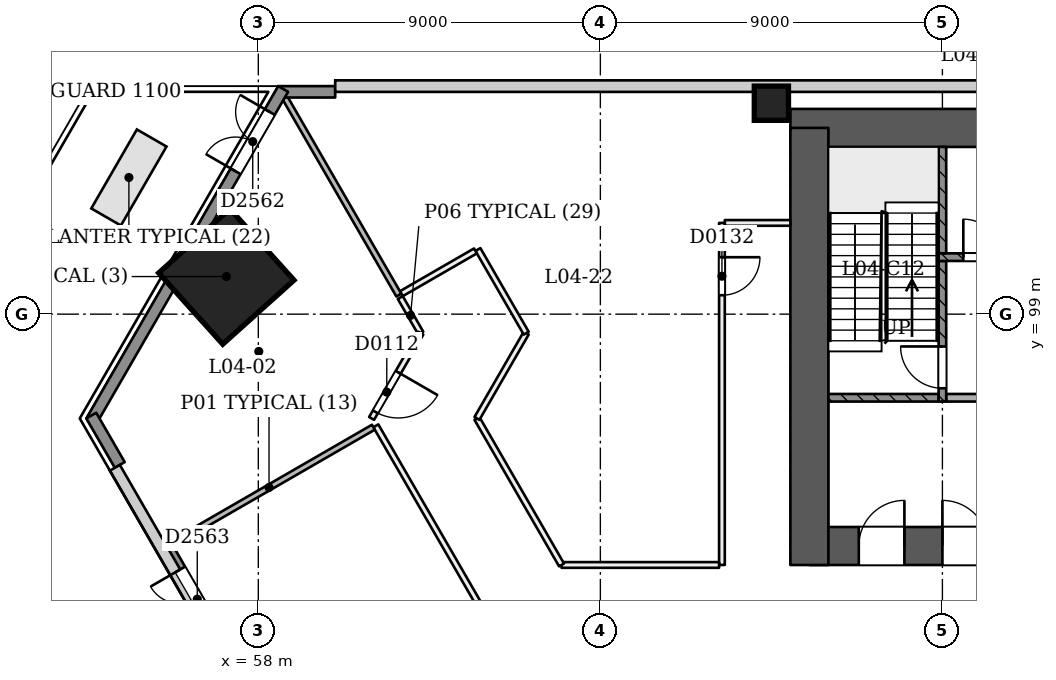
"""IFC4 building model, lengths in metres.
Left out: names, types, materials, properties, quantities, classifications, styles, units other than length and angle.
Written with IfcOpenShell. Run it as: python <this file> out.ifc"""

import sys

from ifc_helpers import new_model, si_unit, direction, frame, frame_2d, origin, origin_2d, place, context, subcontext, project, spatial, rectangle, extrude, element, fill, save


model = new_model("IFC4")
c1 = context("Model", 3, precision=1e-05, world=origin(), true_north=direction((0.0, 1.0)))
c2 = subcontext(c1, "Body", "Model", "MODEL_VIEW")
j1 = project(units=[si_unit("LENGTHUNIT", "METRE"), si_unit("PLANEANGLEUNIT", "RADIAN")], contexts=[c1])
p1 = place(None, origin())
s1 = spatial("IfcSite", under=j1, at=p1, CompositionType="ELEMENT")
p2 = place(p1, origin())
s2 = spatial("IfcBuilding", under=s1, at=p2, CompositionType="ELEMENT")
p3 = place(p2, frame((0.0, 0.0, 22.5)))
s3 = spatial("IfcBuildingStorey", under=s2, at=p3, CompositionType="ELEMENT", Elevation=22.5)
p4 = place(p3, frame((72.5, 92.9, 0.0), z_axis=(0.0, 0.0, 1.0), x_axis=(1.0, 0.0, 0.0)))
e1 = element("IfcWall", 1, at=p4, inside=s3, PredefinedType="SHEAR", context=c2, shape_type="SweptSolid", body=[
    extrude(rectangle(XDim=25.5, YDim=1.0, at=frame_2d((12.75, 0.0))), origin(), (0.0, 0.0, 1.0), 4.5),
])
p5 = place(p4, frame((1.3, 0.0, 0.0)))
e2 = element("IfcOpeningElement", 2, at=p5, cuts=e1, PredefinedType="OPENING", context=c2, shape_type="SweptSolid", body=[
    extrude(rectangle(XDim=1.2, YDim=2.1, at=frame_2d((0.6, 1.05))), frame((0.0, 0.51, 0.0), z_axis=(0.0, -1.0, 0.0), x_axis=(1.0, 0.0, 0.0)), (0.0, 0.0, 1.0), 1.021),
])
p6 = place(p4, frame((3.5, 0.0, 0.0)))
e3 = element("IfcOpeningElement", 3, at=p6, cuts=e1, PredefinedType="OPENING", context=c2, shape_type="SweptSolid", body=[
    extrude(rectangle(XDim=1.2, YDim=2.1, at=frame_2d((0.6, 1.05))), frame((0.0, 0.51, 0.0), z_axis=(0.0, -1.0, 0.0), x_axis=(1.0, 0.0, 0.0)), (0.0, 0.0, 1.0), 1.021),
])
p7 = place(p4, frame((13.5, 0.0, 0.0)))
e4 = element("IfcOpeningElement", 4, at=p7, cuts=e1, PredefinedType="OPENING", context=c2, shape_type="SweptSolid", body=[
    extrude(rectangle(XDim=1.2, YDim=2.1, at=frame_2d((0.6, 1.05))), frame((0.0, 0.51, 0.0), z_axis=(0.0, -1.0, 0.0), x_axis=(1.0, 0.0, 0.0)), (0.0, 0.0, 1.0), 1.021),
])
p8 = place(p4, frame((15.562, 0.0, 0.0)))
e5 = element("IfcOpeningElement", 5, at=p8, cuts=e1, PredefinedType="OPENING", context=c2, shape_type="SweptSolid", body=[
    extrude(rectangle(XDim=1.0, YDim=2.1, at=frame_2d((0.5, 1.05))), frame((0.0, 0.51, 0.0), z_axis=(0.0, -1.0, 0.0), x_axis=(1.0, 0.0, 0.0)), (0.0, 0.0, 1.0), 1.021),
])
p9 = place(p4, frame((17.8, 0.0, 0.0)))
e6 = element("IfcOpeningElement", 6, at=p9, cuts=e1, PredefinedType="OPENING", context=c2, shape_type="SweptSolid", body=[
    extrude(rectangle(XDim=1.0, YDim=2.1, at=frame_2d((0.5, 1.05))), frame((0.0, 0.51, 0.0), z_axis=(0.0, -1.0, 0.0), x_axis=(1.0, 0.0, 0.0)), (0.0, 0.0, 1.0), 1.021),
])
p10 = place(p4, frame((20.35, 0.0, 0.0)))
e7 = element("IfcOpeningElement", 7, at=p10, cuts=e1, PredefinedType="OPENING", context=c2, shape_type="SweptSolid", body=[
    extrude(rectangle(XDim=1.0, YDim=2.1, at=frame_2d((0.5, 1.05))), frame((0.0, 0.51, 0.0), z_axis=(0.0, -1.0, 0.0), x_axis=(1.0, 0.0, 0.0)), (0.0, 0.0, 1.0), 1.021),
])
p11 = place(p4, frame((22.837, 0.0, 0.0)))
e8 = element("IfcOpeningElement", 8, at=p11, cuts=e1, PredefinedType="OPENING", context=c2, shape_type="SweptSolid", body=[
    extrude(rectangle(XDim=1.0, YDim=2.1, at=frame_2d((0.5, 1.05))), frame((0.0, 0.51, 0.0), z_axis=(0.0, -1.0, 0.0), x_axis=(1.0, 0.0, 0.0)), (0.0, 0.0, 1.0), 1.021),
])
p12 = place(p3, frame((97.5, 103.9, 0.0), z_axis=(0.0, 0.0, 1.0), x_axis=(-1.0, 0.0, 0.0)))
e9 = element("IfcWall", 9, at=p12, inside=s3, PredefinedType="SHEAR", context=c2, shape_type="SweptSolid", body=[
    extrude(rectangle(XDim=25.5, YDim=1.0, at=frame_2d((12.75, 0.0))), origin(), (0.0, 0.0, 1.0), 4.5),
])
p13 = place(p3, frame((72.5, 103.9, 0.0), z_axis=(0.0, 0.0, 1.0), x_axis=(0.0, -1.0, 0.0)))
e10 = element("IfcWall", 10, at=p13, inside=s3, PredefinedType="SHEAR", context=c2, shape_type="SweptSolid", body=[
    extrude(rectangle(XDim=11.5, YDim=1.0, at=frame_2d((5.75, 0.0))), origin(), (0.0, 0.0, 1.0), 4.5),
])
p14 = place(p3, frame((57.125, 99.978, 0.0), z_axis=(0.028361945142, 0.009218987905, 0.999555206244), x_axis=(-0.865334335433, 0.500798463027, 0.019934576753)))
e11 = element("IfcColumn", 11, at=p14, inside=s3, PredefinedType="COLUMN", context=c2, shape_type="SweptSolid", body=[
    extrude(rectangle(XDim=2.52, YDim=2.52, at=origin_2d()), origin(), (0.0, 0.0, 1.0), 4.502),
])
p15 = place(p3, frame((71.5, 104.55, 0.0), z_axis=(0.0, 0.0, 1.0), x_axis=(1.0, 0.0, 0.0)))
e12 = element("IfcColumn", 12, at=p15, inside=s3, PredefinedType="COLUMN", context=c2, shape_type="SweptSolid", body=[
    extrude(rectangle(XDim=0.9, YDim=0.9, at=origin_2d()), origin(), (0.0, 0.0, 1.0), 4.5),
])
p16 = place(p3, frame((61.736, 99.436, 0.0), z_axis=(0.0, 0.0, 1.0), x_axis=(0.500002782129, -0.866023797515, 0.0)))
e13 = element("IfcWall", 13, at=p16, inside=s3, PredefinedType="PARTITIONING", context=c2, shape_type="SweptSolid", body=[
    extrude(rectangle(XDim=1.081, YDim=0.15, at=frame_2d((0.54, 0.0))), origin(), (0.0, 0.0, 1.0), 4.0),
])
p17 = place(p3, frame((62.276, 98.5, 0.0), z_axis=(0.0, 0.0, 1.0), x_axis=(-0.499939993713, -0.866060045659, 0.0)))
e14 = element("IfcWall", 14, at=p17, inside=s3, PredefinedType="PARTITIONING", context=c2, shape_type="SweptSolid", body=[
    extrude(rectangle(XDim=2.591, YDim=0.15, at=frame_2d((1.295, 0.0))), origin(), (0.0, 0.0, 1.0), 4.0),
])
p18 = place(p17, frame((1.191, 0.0, 0.0)))
e15 = element("IfcOpeningElement", 15, at=p18, cuts=e14, PredefinedType="OPENING", context=c2, shape_type="SweptSolid", body=[
    extrude(rectangle(XDim=1.2, YDim=2.1, at=frame_2d((0.6, 1.05))), frame((0.0, 0.085, 0.0), z_axis=(0.0, -1.0, 0.0), x_axis=(1.0, 0.0, 0.0)), (0.0, 0.0, 1.0), 0.171),
])
p19 = place(p3, frame((61.093, 96.062, 0.0), z_axis=(0.0, 0.0, 1.0), x_axis=(0.5000018851, -0.866024315419, 0.0)))
e16 = element("IfcWall", 16, at=p19, inside=s3, PredefinedType="PARTITIONING", context=c2, shape_type="SweptSolid", body=[
    extrude(rectangle(XDim=45.0, YDim=0.15, at=frame_2d((22.5, 0.0))), origin(), (0.0, 0.0, 1.0), 3.6),
])
p20 = place(p19, frame((6.15, 0.0, 0.0)))
e17 = element("IfcOpeningElement", 17, at=p20, cuts=e16, PredefinedType="OPENING", context=c2, shape_type="SweptSolid", body=[
    extrude(rectangle(XDim=1.2, YDim=2.1, at=frame_2d((0.6, 1.05))), frame((0.0, 0.085, 0.0), z_axis=(0.0, -1.0, 0.0), x_axis=(1.0, 0.0, 0.0)), (0.0, 0.0, 1.0), 0.171),
])
p21 = place(p19, frame((16.3, 0.0, 0.0)))
e18 = element("IfcOpeningElement", 18, at=p21, cuts=e16, PredefinedType="OPENING", context=c2, shape_type="SweptSolid", body=[
    extrude(rectangle(XDim=1.2, YDim=2.1, at=frame_2d((0.6, 1.05))), frame((0.0, 0.085, 0.0), z_axis=(0.0, -1.0, 0.0), x_axis=(1.0, 0.0, 0.0)), (0.0, 0.0, 1.0), 0.171),
])
p22 = place(p19, frame((24.25, 0.0, 0.0)))
e19 = element("IfcOpeningElement", 19, at=p22, cuts=e16, PredefinedType="OPENING", context=c2, shape_type="SweptSolid", body=[
    extrude(rectangle(XDim=1.0, YDim=2.1, at=frame_2d((0.5, 1.05))), frame((0.0, 0.085, 0.0), z_axis=(0.0, -1.0, 0.0), x_axis=(1.0, 0.0, 0.0)), (0.0, 0.0, 1.0), 0.171),
])
p23 = place(p19, frame((27.721, 0.0, 0.0)))
e20 = element("IfcOpeningElement", 20, at=p23, cuts=e16, PredefinedType="OPENING", context=c2, shape_type="SweptSolid", body=[
    extrude(rectangle(XDim=0.9, YDim=2.1, at=frame_2d((0.45, 1.05))), frame((0.0, 0.085, 0.0), z_axis=(0.0, -1.0, 0.0), x_axis=(1.0, 0.0, 0.0)), (0.0, 0.0, 1.0), 0.171),
])
p24 = place(p19, frame((29.971, 0.0, 0.0)))
e21 = element("IfcOpeningElement", 21, at=p24, cuts=e16, PredefinedType="OPENING", context=c2, shape_type="SweptSolid", body=[
    extrude(rectangle(XDim=0.9, YDim=2.1, at=frame_2d((0.45, 1.05))), frame((0.0, 0.085, 0.0), z_axis=(0.0, -1.0, 0.0), x_axis=(1.0, 0.0, 0.0)), (0.0, 0.0, 1.0), 0.171),
])
p25 = place(p19, frame((37.65, 0.0, 0.0)))
e22 = element("IfcOpeningElement", 22, at=p25, cuts=e16, PredefinedType="OPENING", context=c2, shape_type="SweptSolid", body=[
    extrude(rectangle(XDim=1.2, YDim=2.1, at=frame_2d((0.6, 1.05))), frame((0.0, 0.085, 0.0), z_axis=(0.0, -1.0, 0.0), x_axis=(1.0, 0.0, 0.0)), (0.0, 0.0, 1.0), 0.171),
])
p26 = place(p3, frame((72.0, 101.401, 0.0), z_axis=(0.0, 0.0, 1.0), x_axis=(-0.999999909973, -0.000424328109, 0.0)))
e23 = element("IfcWall", 23, at=p26, inside=s3, PredefinedType="PARTITIONING", context=c2, shape_type="SweptSolid", body=[
    extrude(rectangle(XDim=1.726, YDim=0.15, at=frame_2d((0.863, 0.0))), origin(), (0.0, 0.0, 1.0), 4.0),
])
p27 = place(p3, frame((70.199, 101.4, 0.0), z_axis=(0.0, 0.0, 1.0), x_axis=(0.0, -1.0, 0.0)))
e24 = element("IfcWall", 24, at=p27, inside=s3, PredefinedType="PARTITIONING", context=c2, shape_type="SweptSolid", body=[
    extrude(rectangle(XDim=8.999, YDim=0.15, at=frame_2d((4.5, 0.0))), origin(), (0.0, 0.0, 1.0), 4.0),
])
p28 = place(p27, frame((0.902, 0.0, 0.0)))
e25 = element("IfcOpeningElement", 25, at=p28, cuts=e24, PredefinedType="OPENING", context=c2, shape_type="SweptSolid", body=[
    extrude(rectangle(XDim=1.0, YDim=2.1, at=frame_2d((0.5, 1.05))), frame((0.0, 0.085, 0.0), z_axis=(0.0, -1.0, 0.0), x_axis=(1.0, 0.0, 0.0)), (0.0, 0.0, 1.0), 0.171),
])
p29 = place(p3, frame((70.124, 92.401, 0.0), z_axis=(0.0, 0.0, 1.0), x_axis=(-1.0, 0.0, 0.0)))
e26 = element("IfcWall", 26, at=p29, inside=s3, PredefinedType="PARTITIONING", context=c2, shape_type="SweptSolid", body=[
    extrude(rectangle(XDim=4.145, YDim=0.15, at=frame_2d((2.073, 0.0))), origin(), (0.0, 0.0, 1.0), 4.0),
])
p30 = place(p3, frame((65.979, 92.401, 0.0), z_axis=(0.0, 0.0, 1.0), x_axis=(-0.499978799242, 0.866037643702, 0.0)))
e27 = element("IfcWall", 27, at=p30, inside=s3, PredefinedType="PARTITIONING", context=c2, shape_type="SweptSolid", body=[
    extrude(rectangle(XDim=4.452, YDim=0.15, at=frame_2d((2.226, 0.0))), origin(), (0.0, 0.0, 1.0), 4.0),
])
p31 = place(p3, frame((63.753, 96.256, 0.0), z_axis=(0.0, 0.0, 1.0), x_axis=(0.499939993713, 0.866060045659, 0.0)))
e28 = element("IfcWall", 28, at=p31, inside=s3, PredefinedType="PARTITIONING", context=c2, shape_type="SweptSolid", body=[
    extrude(rectangle(XDim=2.591, YDim=0.15, at=frame_2d((1.295, 0.0))), origin(), (0.0, 0.0, 1.0), 4.0),
])
p32 = place(p3, frame((65.048, 98.5, 0.0), z_axis=(0.0, 0.0, 1.0), x_axis=(-0.500024647231, 0.866011173231, 0.0)))
e29 = element("IfcWall", 29, at=p32, inside=s3, PredefinedType="PARTITIONING", context=c2, shape_type="SweptSolid", body=[
    extrude(rectangle(XDim=2.541, YDim=0.15, at=frame_2d((1.271, 0.0))), origin(), (0.0, 0.0, 1.0), 4.0),
])
p33 = place(p3, frame((63.713, 100.663, 0.0), z_axis=(0.0, 0.0, 1.0), x_axis=(-0.866200031611, -0.499697413678, 0.0)))
e30 = element("IfcWall", 30, at=p33, inside=s3, PredefinedType="PARTITIONING", context=c2, shape_type="SweptSolid", body=[
    extrude(rectangle(XDim=2.251, YDim=0.15, at=frame_2d((1.125, 0.0))), origin(), (0.0, 0.0, 1.0), 4.0),
])
p34 = place(p3, frame((55.536, 92.854, 0.0), z_axis=(0.0, 0.0, 1.0), x_axis=(0.866031065609, 0.499990193304, 0.0)))
e31 = element("IfcWall", 31, at=p34, inside=s3, PredefinedType="PARTITIONING", context=c2, shape_type="SweptSolid", body=[
    extrude(rectangle(XDim=6.341, YDim=0.15, at=frame_2d((3.17, 0.0))), origin(), (0.0, 0.0, 1.0), 3.5),
])
p35 = place(p3, frame((61.698, 99.501, 0.0), z_axis=(0.0, 0.0, 1.0), x_axis=(-0.500013984911, 0.866017329442, 0.0)))
e32 = element("IfcWall", 32, at=p35, inside=s3, PredefinedType="PARTITIONING", context=c2, shape_type="SweptSolid", body=[
    extrude(rectangle(XDim=6.234, YDim=0.15, at=frame_2d((3.117, 0.0))), origin(), (0.0, 0.0, 1.0), 3.5),
])
p36 = place(p3, frame((58.523, 104.85, 0.0), z_axis=(0.0, 0.0, 1.0), x_axis=(1.0, 0.0, 0.0)))
e33 = element("IfcWall", 33, at=p36, inside=s3, PredefinedType="SOLIDWALL", context=c2, shape_type="SweptSolid", body=[
    extrude(rectangle(XDim=1.5, YDim=0.3, at=frame_2d((0.75, 0.0))), origin(), (0.0, 0.0, 1.0), 3.5),
])
p37 = place(p3, frame((53.605, 96.181, 0.0), z_axis=(0.0, 0.0, 1.0), x_axis=(0.499995964007, 0.866027733953, 0.0)))
e34 = element("IfcWall", 34, at=p37, inside=s3, PredefinedType="SOLIDWALL", context=c2, shape_type="SweptSolid", body=[
    extrude(rectangle(XDim=10.096, YDim=0.3, at=frame_2d((5.048, 0.0))), origin(), (0.0, 0.0, 1.0), 3.5),
])
p38 = place(p37, frame((7.596, 0.0, 0.0)))
e35 = element("IfcOpeningElement", 35, at=p38, cuts=e34, PredefinedType="OPENING", context=c2, shape_type="SweptSolid", body=[
    extrude(rectangle(XDim=1.8, YDim=2.4, at=frame_2d((0.9, 1.2))), frame((0.0, 0.161, 0.0), z_axis=(0.0, -1.0, 0.0), x_axis=(1.0, 0.0, 0.0)), (0.0, 0.0, 1.0), 0.321),
])
p39 = place(p3, frame((54.355, 95.032, 0.0), z_axis=(0.0, 0.0, 1.0), x_axis=(-0.499990139034, 0.866031096941, 0.0)))
e36 = element("IfcWall", 36, at=p39, inside=s3, PredefinedType="SOLIDWALL", context=c2, shape_type="SweptSolid", body=[
    extrude(rectangle(XDim=1.5, YDim=0.3, at=frame_2d((0.75, 0.0))), origin(), (0.0, 0.0, 1.0), 3.5),
])
p40 = place(p3, frame((57.144, 90.203, 0.0), z_axis=(0.0, 0.0, 1.0), x_axis=(-0.50002537861, 0.866010750942, 0.0)))
e37 = element("IfcWall", 37, at=p40, inside=s3, PredefinedType="SOLIDWALL", context=c2, shape_type="SweptSolid", body=[
    extrude(rectangle(XDim=3.0, YDim=0.3, at=frame_2d((1.5, 0.0))), origin(), (0.0, 0.0, 1.0), 3.5),
])
p41 = place(p40, frame((0.6, 0.0, 0.0)))
e38 = element("IfcOpeningElement", 38, at=p41, cuts=e37, PredefinedType="OPENING", context=c2, shape_type="SweptSolid", body=[
    extrude(rectangle(XDim=1.8, YDim=2.4, at=frame_2d((0.9, 1.2))), frame((0.0, 0.161, 0.0), z_axis=(0.0, -1.0, 0.0), x_axis=(1.0, 0.0, 0.0)), (0.0, 0.0, 1.0), 0.321),
])
p42 = place(p3, frame((73.0, 96.8, 0.0), z_axis=(0.0, 0.0, 1.0), x_axis=(1.0, 0.0, 0.0)))
e39 = element("IfcWall", 39, at=p42, inside=s3, PredefinedType="SOLIDWALL", context=c2, shape_type="SweptSolid", body=[
    extrude(rectangle(XDim=2.9, YDim=0.2, at=frame_2d((1.45, 0.0))), origin(), (0.0, 0.0, 1.0), 4.0),
])
p43 = place(p3, frame((76.0, 96.7, 0.0), z_axis=(0.0, 0.0, 1.0), x_axis=(0.0, 1.0, 0.0)))
e40 = element("IfcWall", 40, at=p43, inside=s3, PredefinedType="SOLIDWALL", context=c2, shape_type="SweptSolid", body=[
    extrude(rectangle(XDim=3.7, YDim=0.2, at=frame_2d((1.85, 0.0))), origin(), (0.0, 0.0, 1.0), 4.0),
])
p44 = place(p43, frame((0.35, 0.0, 0.0)))
e41 = element("IfcOpeningElement", 41, at=p44, cuts=e40, PredefinedType="OPENING", context=c2, shape_type="SweptSolid", body=[
    extrude(rectangle(XDim=1.1, YDim=2.1, at=frame_2d((0.55, 1.05))), frame((0.0, 0.11, 0.0), z_axis=(0.0, -1.0, 0.0), x_axis=(1.0, 0.0, 0.0)), (0.0, 0.0, 1.0), 0.221),
])
p45 = place(p3, frame((76.1, 96.8, 0.0), z_axis=(0.0, 0.0, 1.0), x_axis=(1.0, 0.0, 0.0)))
e42 = element("IfcWall", 42, at=p45, inside=s3, PredefinedType="PARTITIONING", context=c2, shape_type="SweptSolid", body=[
    extrude(rectangle(XDim=1.9, YDim=0.2, at=frame_2d((0.95, 0.0))), origin(), (0.0, 0.0, 1.0), 4.0),
])
p46 = place(p3, frame((75.9, 100.5, 0.0), z_axis=(0.0, 0.0, 1.0), x_axis=(1.0, 0.0, 0.0)))
e43 = element("IfcWall", 43, at=p46, inside=s3, PredefinedType="SOLIDWALL", context=c2, shape_type="SweptSolid", body=[
    extrude(rectangle(XDim=18.2, YDim=0.2, at=frame_2d((9.1, 0.0))), origin(), (0.0, 0.0, 1.0), 4.0),
])
p47 = place(p46, frame((2.6, 0.0, 0.0)))
e44 = element("IfcOpeningElement", 44, at=p47, cuts=e43, PredefinedType="OPENING", context=c2, shape_type="SweptSolid", body=[
    extrude(rectangle(XDim=1.1, YDim=2.1, at=frame_2d((0.55, 1.05))), frame((0.0, 0.11, 0.0), z_axis=(0.0, -1.0, 0.0), x_axis=(1.0, 0.0, 0.0)), (0.0, 0.0, 1.0), 0.221),
])
p48 = place(p46, frame((4.5, 0.0, 0.0)))
e45 = element("IfcOpeningElement", 45, at=p48, cuts=e43, PredefinedType="OPENING", context=c2, shape_type="SweptSolid", body=[
    extrude(rectangle(XDim=1.1, YDim=2.1, at=frame_2d((0.55, 1.05))), frame((0.0, 0.11, 0.0), z_axis=(0.0, -1.0, 0.0), x_axis=(1.0, 0.0, 0.0)), (0.0, 0.0, 1.0), 0.221),
])
p49 = place(p46, frame((6.4, 0.0, 0.0)))
e46 = element("IfcOpeningElement", 46, at=p49, cuts=e43, PredefinedType="OPENING", context=c2, shape_type="SweptSolid", body=[
    extrude(rectangle(XDim=1.1, YDim=2.1, at=frame_2d((0.55, 1.05))), frame((0.0, 0.11, 0.0), z_axis=(0.0, -1.0, 0.0), x_axis=(1.0, 0.0, 0.0)), (0.0, 0.0, 1.0), 0.221),
])
p50 = place(p46, frame((8.3, 0.0, 0.0)))
e47 = element("IfcOpeningElement", 47, at=p50, cuts=e43, PredefinedType="OPENING", context=c2, shape_type="SweptSolid", body=[
    extrude(rectangle(XDim=1.1, YDim=2.1, at=frame_2d((0.55, 1.05))), frame((0.0, 0.11, 0.0), z_axis=(0.0, -1.0, 0.0), x_axis=(1.0, 0.0, 0.0)), (0.0, 0.0, 1.0), 0.221),
])
p51 = place(p46, frame((10.2, 0.0, 0.0)))
e48 = element("IfcOpeningElement", 48, at=p51, cuts=e43, PredefinedType="OPENING", context=c2, shape_type="SweptSolid", body=[
    extrude(rectangle(XDim=1.1, YDim=2.1, at=frame_2d((0.55, 1.05))), frame((0.0, 0.11, 0.0), z_axis=(0.0, -1.0, 0.0), x_axis=(1.0, 0.0, 0.0)), (0.0, 0.0, 1.0), 0.221),
])
p52 = place(p46, frame((12.1, 0.0, 0.0)))
e49 = element("IfcOpeningElement", 49, at=p52, cuts=e43, PredefinedType="OPENING", context=c2, shape_type="SweptSolid", body=[
    extrude(rectangle(XDim=1.1, YDim=2.1, at=frame_2d((0.55, 1.05))), frame((0.0, 0.11, 0.0), z_axis=(0.0, -1.0, 0.0), x_axis=(1.0, 0.0, 0.0)), (0.0, 0.0, 1.0), 0.221),
])
p53 = place(p46, frame((14.0, 0.0, 0.0)))
e50 = element("IfcOpeningElement", 50, at=p53, cuts=e43, PredefinedType="OPENING", context=c2, shape_type="SweptSolid", body=[
    extrude(rectangle(XDim=1.1, YDim=2.1, at=frame_2d((0.55, 1.05))), frame((0.0, 0.11, 0.0), z_axis=(0.0, -1.0, 0.0), x_axis=(1.0, 0.0, 0.0)), (0.0, 0.0, 1.0), 0.221),
])
p54 = place(p46, frame((0.65, 0.0, 0.0)))
e51 = element("IfcOpeningElement", 51, at=p54, cuts=e43, PredefinedType="OPENING", context=c2, shape_type="SweptSolid", body=[
    extrude(rectangle(XDim=1.0, YDim=2.1, at=frame_2d((0.5, 1.05))), frame((0.0, 0.11, 0.0), z_axis=(0.0, -1.0, 0.0), x_axis=(1.0, 0.0, 0.0)), (0.0, 0.0, 1.0), 0.221),
])
p55 = place(p46, frame((16.3, 0.0, 0.0)))
e52 = element("IfcOpeningElement", 52, at=p55, cuts=e43, PredefinedType="OPENING", context=c2, shape_type="SweptSolid", body=[
    extrude(rectangle(XDim=1.0, YDim=2.1, at=frame_2d((0.5, 1.05))), frame((0.0, 0.11, 0.0), z_axis=(0.0, -1.0, 0.0), x_axis=(1.0, 0.0, 0.0)), (0.0, 0.0, 1.0), 0.221),
])
p56 = place(p3, frame((76.0, 100.6, 0.0), z_axis=(0.0, 0.0, 1.0), x_axis=(0.0, 1.0, 0.0)))
e53 = element("IfcWall", 53, at=p56, inside=s3, PredefinedType="SOLIDWALL", context=c2, shape_type="SweptSolid", body=[
    extrude(rectangle(XDim=2.8, YDim=0.2, at=frame_2d((1.4, 0.0))), origin(), (0.0, 0.0, 1.0), 4.0),
])
p57 = place(p18, origin())
e54 = element("IfcDoor", 54, at=p57, inside=s3, OperationType="SINGLE_SWING_LEFT", PredefinedType="NOTDEFINED", context=c2, shape_type="SweptSolid", body=[
    extrude(rectangle(XDim=1.2, YDim=2.1, at=frame_2d((0.6, 1.05))), frame((0.0, 0.025, 0.0), z_axis=(0.0, -1.0, 0.0), x_axis=(1.0, 0.0, 0.0)), (0.0, 0.0, 1.0), 0.05),
])
fill(e15, e54)
p58 = place(p28, origin())
e55 = element("IfcDoor", 55, at=p58, inside=s3, OperationType="SINGLE_SWING_LEFT", PredefinedType="NOTDEFINED", context=c2, shape_type="SweptSolid", body=[
    extrude(rectangle(XDim=1.0, YDim=2.1, at=frame_2d((0.5, 1.05))), frame((0.0, 0.025, 0.0), z_axis=(0.0, -1.0, 0.0), x_axis=(1.0, 0.0, 0.0)), (0.0, 0.0, 1.0), 0.05),
])
fill(e25, e55)
p59 = place(p38, origin())
e56 = element("IfcDoor", 56, at=p59, inside=s3, OperationType="DOUBLE_DOOR_SINGLE_SWING", PredefinedType="NOTDEFINED", context=c2, shape_type="SweptSolid", body=[
    extrude(rectangle(XDim=1.8, YDim=2.4, at=frame_2d((0.9, 1.2))), frame((0.0, 0.025, 0.0), z_axis=(0.0, -1.0, 0.0), x_axis=(1.0, 0.0, 0.0)), (0.0, 0.0, 1.0), 0.05),
])
fill(e35, e56)
p60 = place(p41, origin())
e57 = element("IfcDoor", 57, at=p60, inside=s3, OperationType="DOUBLE_DOOR_SINGLE_SWING", PredefinedType="NOTDEFINED", context=c2, shape_type="SweptSolid", body=[
    extrude(rectangle(XDim=1.8, YDim=2.4, at=frame_2d((0.9, 1.2))), frame((0.0, 0.025, 0.0), z_axis=(0.0, -1.0, 0.0), x_axis=(1.0, 0.0, 0.0)), (0.0, 0.0, 1.0), 0.05),
])
fill(e38, e57)
p61 = place(p44, origin())
e58 = element("IfcDoor", 58, at=p61, inside=s3, OperationType="SINGLE_SWING_RIGHT", PredefinedType="NOTDEFINED", context=c2, shape_type="SweptSolid", body=[
    extrude(rectangle(XDim=1.1, YDim=2.1, at=frame_2d((0.55, 1.05))), frame((0.0, 0.025, 0.0), z_axis=(0.0, -1.0, 0.0), x_axis=(1.0, 0.0, 0.0)), (0.0, 0.0, 1.0), 0.05),
])
fill(e41, e58)
p62 = place(p5, origin())
e59 = element("IfcDoor", 59, at=p62, inside=s3, OperationType="SINGLE_SWING_RIGHT", PredefinedType="NOTDEFINED", context=c2, shape_type="SweptSolid", body=[
    extrude(rectangle(XDim=1.2, YDim=2.1, at=frame_2d((0.6, 1.05))), frame((0.0, 0.025, 0.0), z_axis=(0.0, -1.0, 0.0), x_axis=(1.0, 0.0, 0.0)), (0.0, 0.0, 1.0), 0.05),
])
fill(e2, e59)
p63 = place(p6, origin())
e60 = element("IfcDoor", 60, at=p63, inside=s3, OperationType="SINGLE_SWING_LEFT", PredefinedType="NOTDEFINED", context=c2, shape_type="SweptSolid", body=[
    extrude(rectangle(XDim=1.2, YDim=2.1, at=frame_2d((0.6, 1.05))), frame((0.0, 0.025, 0.0), z_axis=(0.0, -1.0, 0.0), x_axis=(1.0, 0.0, 0.0)), (0.0, 0.0, 1.0), 0.05),
])
fill(e3, e60)
p64 = place(p54, origin())
e61 = element("IfcDoor", 61, at=p64, inside=s3, OperationType="SINGLE_SWING_LEFT", PredefinedType="NOTDEFINED", context=c2, shape_type="SweptSolid", body=[
    extrude(rectangle(XDim=1.0, YDim=2.1, at=frame_2d((0.5, 1.05))), frame((0.0, 0.025, 0.0), z_axis=(0.0, -1.0, 0.0), x_axis=(1.0, 0.0, 0.0)), (0.0, 0.0, 1.0), 0.05),
])
fill(e51, e61)
save(model, sys.argv[1])
